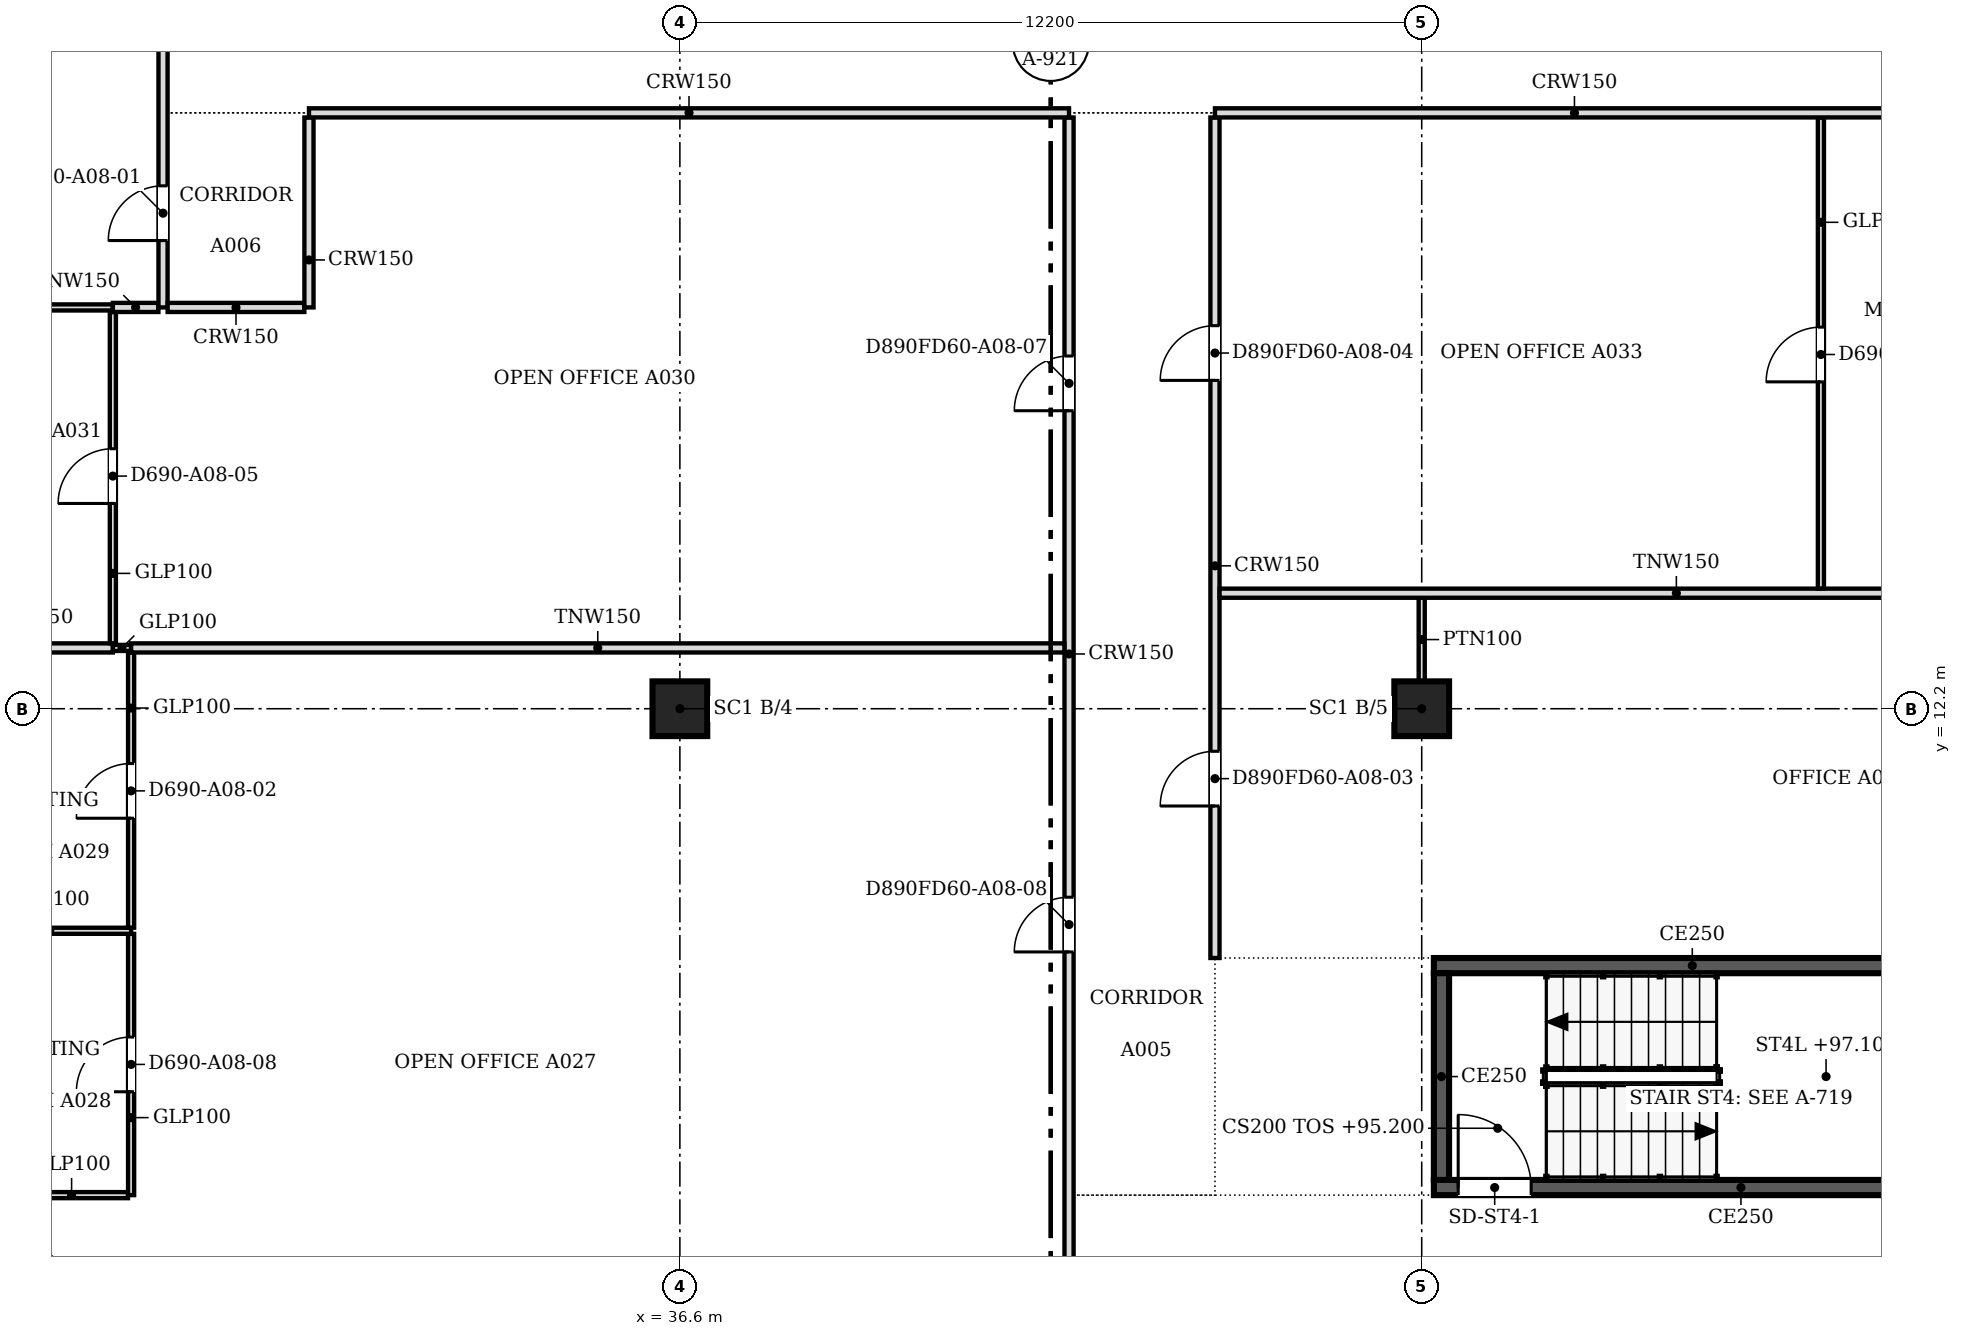
"""IFC4 building model, lengths in metres.
Left out: names, types, materials, properties, quantities, classifications, styles, units other than length and angle.
Written with IfcOpenShell. Run it as: python <this file> out.ifc"""

import sys

from ifc_helpers import new_model, si_unit, direction, frame, frame_2d, origin, origin_2d, place, context, subcontext, project, spatial, polyline, rectangle, outline, extrude, faceted_brep, source, transform, mapped, element, fill, save


model = new_model("IFC4")
c1 = context("Model", 3, precision=1e-05, world=origin(), true_north=direction((0.0, 1.0)))
c2 = subcontext(c1, "Body", "Model", "MODEL_VIEW")
j1 = project(units=[si_unit("LENGTHUNIT", "METRE"), si_unit("PLANEANGLEUNIT", "RADIAN")], contexts=[c1])
p1 = place(None, origin())
s1 = spatial("IfcSite", under=j1, at=p1, CompositionType="ELEMENT")
p2 = place(p1, origin())
s2 = spatial("IfcBuilding", under=s1, at=p2, CompositionType="ELEMENT")
p3 = place(p2, frame((0.0, 0.0, 95.2)))
s3 = spatial("IfcBuildingStorey", under=s2, at=p3, CompositionType="ELEMENT", Elevation=95.2)
for number, where, z_axis, x_axis in (
    (1, (36.6, 12.2, 0.0), (0.0, 0.0, 1.0), (1.0, 0.0, 0.0)),
    (2, (48.8, 12.2, 0.0), (0.0, 0.0, 1.0), (1.0, 0.0, 0.0)),
):
    element("IfcColumn", number, at=place(p3, frame(where, z_axis=z_axis, x_axis=x_axis)), inside=s3, PredefinedType="COLUMN", context=c2, shape_type="SweptSolid", body=[
        extrude(rectangle(XDim=0.9, YDim=0.9, at=origin_2d()), origin(), (0.0, 0.0, 1.0), 3.6),
    ])
m1 = source(origin(), c2, "Body", "Brep", [
    faceted_brep([(2.944, -0.25, 0.0), (2.997, -0.25, 0.068), (2.997, -0.25, 7.532), (2.944, -0.25, 7.6), (0.0, -0.25, 3.8), (0.053, 0.25, 3.868), (2.891, 0.25, 7.532), (2.891, 0.25, 0.068), (0.053, 0.25, 3.732), (2.944, 0.0, 0.0), (2.944, 0.0, 7.6), (0.0, 0.0, 3.8)], [[[0, 1, 2, 3, 4]], [[5, 6, 7, 8]], [[1, 0, 9]], [[10, 3, 2]], [[6, 5, 11, 4, 3, 10]], [[8, 7, 9, 0, 4, 11]], [[8, 11, 5]], [[1, 9, 7, 6, 10, 2]]]),
])
p4 = place(p3, frame((25.712, 3.394, -3.8), z_axis=(0.0, 0.0, 1.0), x_axis=(0.707066050402, -0.707147509625, 0.0)))
e3 = element("IfcWall", 3, at=p4, inside=s3, PredefinedType="SOLIDWALL", context=c2, shape_type="MappedRepresentation", body=[
    mapped(m1, transform((0.0, 0.0, 0.0), scale=1.0)),
])
m2 = source(origin(), c2, "Body", "SweptSolid", [
    extrude(outline(polyline([(2.744, 6.934), (0.316, 3.8), (2.744, 0.667), (2.744, 6.934)])), frame((0.0, 0.26, 0.0), z_axis=(0.0, -1.0, 0.0), x_axis=(1.0, 0.0, 0.0)), (0.0, 0.0, 1.0), 0.52),
])
p5 = place(p4, origin())
e4 = element("IfcOpeningElement", 4, at=p5, cuts=e3, PredefinedType="OPENING", context=c2, shape_type="MappedRepresentation", body=[
    mapped(m2, transform((0.0, 0.0, 0.0), scale=1.0)),
])
p6 = place(p2, frame((0.0, 0.0, 99.0)))
s4 = spatial("IfcBuildingStorey", under=s2, at=p6, CompositionType="ELEMENT", Elevation=99.0)
m3 = source(origin(), c2, "Body", "Brep", [
    faceted_brep([(0.053, -0.25, 0.0), (2.997, -0.25, 3.8), (0.053, -0.25, 7.6), (0.0, -0.25, 7.532), (0.0, -0.25, 0.068), (0.106, 0.25, 7.532), (2.944, 0.25, 3.868), (2.944, 0.25, 3.732), (0.106, 0.25, 0.068), (2.997, 0.0, 3.8), (0.053, 0.0, 0.0), (0.053, 0.0, 7.6)], [[[0, 1, 2, 3, 4]], [[5, 6, 7, 8]], [[8, 7, 9, 1, 0, 10]], [[6, 5, 11, 2, 1, 9]], [[3, 2, 11]], [[10, 0, 4]], [[8, 10, 4, 3, 11, 5]], [[9, 7, 6]]]),
])
p7 = place(p6, frame((25.675, 3.431, -3.8), z_axis=(0.0, 0.0, 1.0), x_axis=(0.707106781187, -0.707106781187, 0.0)))
e5 = element("IfcWall", 5, at=p7, inside=s4, PredefinedType="SOLIDWALL", context=c2, shape_type="MappedRepresentation", body=[
    mapped(m3, transform((0.0, 0.0, 0.0), scale=1.0)),
])
m4 = source(origin(), c2, "Body", "SweptSolid", [
    extrude(outline(polyline([(0.253, 0.666), (2.681, 3.8), (0.253, 6.934), (0.253, 0.666)])), frame((0.0, 0.26, 0.0), z_axis=(0.0, -1.0, 0.0), x_axis=(1.0, 0.0, 0.0)), (0.0, 0.0, 1.0), 0.52),
])
p8 = place(p7, origin())
e6 = element("IfcOpeningElement", 6, at=p8, cuts=e5, PredefinedType="OPENING", context=c2, shape_type="MappedRepresentation", body=[
    mapped(m4, transform((0.0, 0.0, 0.0), scale=1.0)),
])
p9 = place(p3, frame((57.5, 4.325, 0.0), z_axis=(0.0, 0.0, 1.0), x_axis=(-1.0, 0.0, 0.0)))
e7 = element("IfcWall", 7, at=p9, inside=s3, PredefinedType="SOLIDWALL", context=c2, shape_type="SweptSolid", body=[
    extrude(rectangle(XDim=8.5, YDim=0.25, at=frame_2d((4.25, 0.0))), origin(), (0.0, 0.0, 1.0), 3.8),
])
m5 = source(origin(), c2, "Body", "SweptSolid", [
    extrude(rectangle(XDim=1.2, YDim=2.1, at=frame_2d((0.6, 1.05))), frame((0.0, 0.135, 0.0), z_axis=(0.0, -1.0, 0.0), x_axis=(1.0, 0.0, 0.0)), (0.0, 0.0, 1.0), 0.27),
])
p10 = place(p9, frame((6.9, 0.0, 0.0)))
e8 = element("IfcOpeningElement", 8, at=p10, cuts=e7, PredefinedType="OPENING", context=c2, shape_type="MappedRepresentation", body=[
    mapped(m5, transform((0.0, 0.0, 0.0), scale=1.0)),
])
p11 = place(p3, frame((49.125, 4.45, 0.0), z_axis=(0.0, 0.0, 1.0), x_axis=(0.0, 1.0, 0.0)))
e9 = element("IfcWall", 9, at=p11, inside=s3, PredefinedType="SOLIDWALL", context=c2, shape_type="SweptSolid", body=[
    extrude(rectangle(XDim=3.4, YDim=0.25, at=frame_2d((1.7, 0.0))), origin(), (0.0, 0.0, 1.0), 3.8),
])
p12 = place(p3, frame((49.0, 7.975, 0.0), z_axis=(0.0, 0.0, 1.0), x_axis=(1.0, 0.0, 0.0)))
e10 = element("IfcWall", 10, at=p12, inside=s3, PredefinedType="SOLIDWALL", context=c2, shape_type="SweptSolid", body=[
    extrude(rectangle(XDim=8.5, YDim=0.25, at=frame_2d((4.25, 0.0))), origin(), (0.0, 0.0, 1.0), 3.8),
])
p13 = place(p3, frame((43.0, 0.5, 0.0), z_axis=(0.0, 0.0, 1.0), x_axis=(0.0, 1.0, 0.0)))
e11 = element("IfcWall", 11, at=p13, inside=s3, PredefinedType="PARTITIONING", context=c2, shape_type="SweptSolid", body=[
    extrude(rectangle(XDim=21.424, YDim=0.15, at=frame_2d((10.712, 0.0))), origin(), (0.0, 0.0, 1.0), 3.067),
])
m6 = source(origin(), c2, "Body", "SweptSolid", [
    extrude(rectangle(XDim=0.9, YDim=2.1, at=frame_2d((0.45, 1.05))), frame((0.0, 0.085, 0.0), z_axis=(0.0, -1.0, 0.0), x_axis=(1.0, 0.0, 0.0)), (0.0, 0.0, 1.0), 0.17),
])
p14 = place(p13, frame((16.601, 0.0, 0.0)))
e12 = element("IfcOpeningElement", 12, at=p14, cuts=e11, PredefinedType="OPENING", context=c2, shape_type="MappedRepresentation", body=[
    mapped(m6, transform((0.0, 0.0, 0.0), scale=1.0)),
])
p15 = place(p13, frame((7.7, 0.0, 0.0)))
e13 = element("IfcOpeningElement", 13, at=p15, cuts=e11, PredefinedType="OPENING", context=c2, shape_type="MappedRepresentation", body=[
    mapped(m6, transform((0.0, 0.0, 0.0), scale=1.0)),
])
p16 = place(p3, frame((25.669, 4.2, 0.0), z_axis=(0.0, 0.0, 1.0), x_axis=(1.0, 0.0, 0.0)))
e14 = element("IfcWall", 14, at=p16, inside=s3, PredefinedType="PARTITIONING", context=c2, shape_type="SweptSolid", body=[
    extrude(rectangle(XDim=1.855, YDim=0.1, at=frame_2d((0.928, 0.0))), origin(), (0.0, 0.0, 1.0), 3.067),
])
p17 = place(p3, frame((27.575, 4.2, 0.0), z_axis=(0.0, 0.0, 1.0), x_axis=(0.0, 1.0, 0.0)))
e15 = element("IfcWall", 15, at=p17, inside=s3, PredefinedType="PARTITIONING", context=c2, shape_type="SweptSolid", body=[
    extrude(rectangle(XDim=4.297, YDim=0.1, at=frame_2d((2.148, 0.0))), origin(), (0.0, 0.0, 1.0), 3.067),
])
m7 = source(origin(), c2, "Body", "SweptSolid", [
    extrude(rectangle(XDim=0.9, YDim=2.1, at=frame_2d((0.45, 1.05))), frame((0.0, 0.06, 0.0), z_axis=(0.0, -1.0, 0.0), x_axis=(1.0, 0.0, 0.0)), (0.0, 0.0, 1.0), 0.12),
])
p18 = place(p17, frame((1.7, 0.0, 0.0)))
e16 = element("IfcOpeningElement", 16, at=p18, cuts=e15, PredefinedType="OPENING", context=c2, shape_type="MappedRepresentation", body=[
    mapped(m7, transform((0.0, 0.0, 0.0), scale=1.0)),
])
p19 = place(p3, frame((45.4, 21.924, 0.0), z_axis=(0.0, 0.0, 1.0), x_axis=(0.0, -1.0, 0.0)))
e17 = element("IfcWall", 17, at=p19, inside=s3, PredefinedType="PARTITIONING", context=c2, shape_type="SweptSolid", body=[
    extrude(rectangle(XDim=13.824, YDim=0.15, at=frame_2d((6.912, 0.0))), origin(), (0.0, 0.0, 1.0), 3.067),
])
p20 = place(p19, frame((10.424, 0.0, 0.0)))
e18 = element("IfcOpeningElement", 18, at=p20, cuts=e17, PredefinedType="OPENING", context=c2, shape_type="MappedRepresentation", body=[
    mapped(m6, transform((0.0, 0.0, 0.0), scale=1.0)),
])
p21 = place(p19, frame((3.424, 0.0, 0.0)))
e19 = element("IfcOpeningElement", 19, at=p21, cuts=e17, PredefinedType="OPENING", context=c2, shape_type="MappedRepresentation", body=[
    mapped(m6, transform((0.0, 0.0, 0.0), scale=1.0)),
])
p22 = place(p3, frame((24.9, 8.548, 0.0), z_axis=(0.0, 0.0, 1.0), x_axis=(1.0, 0.0, 0.0)))
e20 = element("IfcWall", 20, at=p22, inside=s3, PredefinedType="PARTITIONING", context=c2, shape_type="SweptSolid", body=[
    extrude(rectangle(XDim=2.675, YDim=0.1, at=frame_2d((1.337, 0.0))), origin(), (0.0, 0.0, 1.0), 3.067),
])
p23 = place(p3, frame((27.575, 8.599, 0.0), z_axis=(0.0, 0.0, 1.0), x_axis=(0.0, 1.0, 0.0)))
e21 = element("IfcWall", 21, at=p23, inside=s3, PredefinedType="PARTITIONING", context=c2, shape_type="SweptSolid", body=[
    extrude(rectangle(XDim=4.525, YDim=0.1, at=frame_2d((2.263, 0.0))), origin(), (0.0, 0.0, 1.0), 3.067),
])
p24 = place(p23, frame((1.8, 0.0, 0.0)))
e22 = element("IfcOpeningElement", 22, at=p24, cuts=e21, PredefinedType="OPENING", context=c2, shape_type="MappedRepresentation", body=[
    mapped(m7, transform((0.0, 0.0, 0.0), scale=1.0)),
])
p25 = place(p3, frame((48.8, 12.65, 0.0), z_axis=(0.0, 0.0, 1.0), x_axis=(0.0, 1.0, 0.0)))
e23 = element("IfcWall", 23, at=p25, inside=s3, PredefinedType="PARTITIONING", context=c2, shape_type="SweptSolid", body=[
    extrude(rectangle(XDim=1.375, YDim=0.1, at=frame_2d((0.688, 0.0))), origin(), (0.0, 0.0, 1.0), 3.067),
])
p26 = place(p3, frame((24.55, 13.2, 0.0), z_axis=(0.0, 0.0, 1.0), x_axis=(1.0, 0.0, 0.0)))
e24 = element("IfcWall", 24, at=p26, inside=s3, PredefinedType="PARTITIONING", context=c2, shape_type="SweptSolid", body=[
    extrude(rectangle(XDim=2.725, YDim=0.15, at=frame_2d((1.362, 0.0))), origin(), (0.0, 0.0, 1.0), 3.067),
])
p27 = place(p3, frame((27.276, 13.2, 0.0), z_axis=(0.0, 0.0, 1.0), x_axis=(1.0, 0.0, 0.0)))
e25 = element("IfcWall", 25, at=p27, inside=s3, PredefinedType="PARTITIONING", context=c2, shape_type="SweptSolid", body=[
    extrude(rectangle(XDim=0.298, YDim=0.1, at=frame_2d((0.149, 0.0))), origin(), (0.0, 0.0, 1.0), 3.067),
])
p28 = place(p3, frame((27.575, 13.2, 0.0), z_axis=(0.0, 0.0, 1.0), x_axis=(1.0, 0.0, 0.0)))
e26 = element("IfcWall", 26, at=p28, inside=s3, PredefinedType="PARTITIONING", context=c2, shape_type="SweptSolid", body=[
    extrude(rectangle(XDim=15.349, YDim=0.15, at=frame_2d((7.675, 0.0))), origin(), (0.0, 0.0, 1.0), 3.067),
])
p29 = place(p3, frame((27.275, 13.276, 0.0), z_axis=(0.0, 0.0, 1.0), x_axis=(0.0, 1.0, 0.0)))
e27 = element("IfcWall", 27, at=p29, inside=s3, PredefinedType="PARTITIONING", context=c2, shape_type="SweptSolid", body=[
    extrude(rectangle(XDim=5.448, YDim=0.1, at=frame_2d((2.724, 0.0))), origin(), (0.0, 0.0, 1.0), 3.067),
])
p30 = place(p29, frame((2.3, 0.0, 0.0)))
e28 = element("IfcOpeningElement", 28, at=p30, cuts=e27, PredefinedType="OPENING", context=c2, shape_type="MappedRepresentation", body=[
    mapped(m7, transform((0.0, 0.0, 0.0), scale=1.0)),
])
p31 = place(p3, frame((45.476, 14.1, 0.0), z_axis=(0.0, 0.0, 1.0), x_axis=(1.0, 0.0, 0.0)))
e29 = element("IfcWall", 29, at=p31, inside=s3, PredefinedType="PARTITIONING", context=c2, shape_type="SweptSolid", body=[
    extrude(rectangle(XDim=15.024, YDim=0.15, at=frame_2d((7.512, 0.0))), origin(), (0.0, 0.0, 1.0), 3.067),
])
p32 = place(p3, frame((55.365, 21.924, 0.0), z_axis=(0.0, 0.0, 1.0), x_axis=(0.0, -1.0, 0.0)))
e30 = element("IfcWall", 30, at=p32, inside=s3, PredefinedType="PARTITIONING", context=c2, shape_type="SweptSolid", body=[
    extrude(rectangle(XDim=7.748, YDim=0.1, at=frame_2d((3.874, 0.0))), origin(), (0.0, 0.0, 1.0), 3.067),
])
p33 = place(p32, frame((3.448, 0.0, 0.0)))
e31 = element("IfcOpeningElement", 31, at=p33, cuts=e30, PredefinedType="OPENING", context=c2, shape_type="MappedRepresentation", body=[
    mapped(m7, transform((0.0, 0.0, 0.0), scale=1.0)),
])
p34 = place(p3, frame((22.0, 18.8, 0.0), z_axis=(0.0, 0.0, 1.0), x_axis=(1.0, 0.0, 0.0)))
e32 = element("IfcWall", 32, at=p34, inside=s3, PredefinedType="PARTITIONING", context=c2, shape_type="SweptSolid", body=[
    extrude(rectangle(XDim=5.274, YDim=0.1, at=frame_2d((2.637, 0.0))), origin(), (0.0, 0.0, 1.0), 3.067),
])
p35 = place(p3, frame((27.275, 18.8, 0.0), z_axis=(0.0, 0.0, 1.0), x_axis=(1.0, 0.0, 0.0)))
e33 = element("IfcWall", 33, at=p35, inside=s3, PredefinedType="PARTITIONING", context=c2, shape_type="SweptSolid", body=[
    extrude(rectangle(XDim=0.749, YDim=0.15, at=frame_2d((0.375, 0.0))), origin(), (0.0, 0.0, 1.0), 3.067),
])
p36 = place(p3, frame((28.1, 18.8, 0.0), z_axis=(0.0, 0.0, 1.0), x_axis=(0.0, 1.0, 0.0)))
e34 = element("IfcWall", 34, at=p36, inside=s3, PredefinedType="PARTITIONING", context=c2, shape_type="SweptSolid", body=[
    extrude(rectangle(XDim=26.424, YDim=0.15, at=frame_2d((13.212, 0.0))), origin(), (0.0, 0.0, 1.0), 3.067),
])
p37 = place(p36, frame((1.1, 0.0, 0.0)))
e35 = element("IfcOpeningElement", 35, at=p37, cuts=e34, PredefinedType="OPENING", context=c2, shape_type="MappedRepresentation", body=[
    mapped(m6, transform((0.0, 0.0, 0.0), scale=1.0)),
])
p38 = place(p36, frame((23.151, 0.0, 0.0)))
e36 = element("IfcOpeningElement", 36, at=p38, cuts=e34, PredefinedType="OPENING", context=c2, shape_type="MappedRepresentation", body=[
    mapped(m6, transform((0.0, 0.0, 0.0), scale=1.0)),
])
m8 = source(origin(), c2, "Body", "SweptSolid", [
    extrude(rectangle(XDim=1.0, YDim=2.1, at=frame_2d((0.5, 1.05))), frame((0.0, 0.085, 0.0), z_axis=(0.0, -1.0, 0.0), x_axis=(1.0, 0.0, 0.0)), (0.0, 0.0, 1.0), 0.17),
])
p39 = place(p36, frame((17.251, 0.0, 0.0)))
e37 = element("IfcOpeningElement", 37, at=p39, cuts=e34, PredefinedType="OPENING", context=c2, shape_type="MappedRepresentation", body=[
    mapped(m8, transform((0.0, 0.0, 0.0), scale=1.0)),
])
p40 = place(p36, frame((9.7, 0.0, 0.0)))
e38 = element("IfcOpeningElement", 38, at=p40, cuts=e34, PredefinedType="OPENING", context=c2, shape_type="MappedRepresentation", body=[
    mapped(m6, transform((0.0, 0.0, 0.0), scale=1.0)),
])
p41 = place(p3, frame((28.176, 18.8, 0.0), z_axis=(0.0, 0.0, 1.0), x_axis=(1.0, 0.0, 0.0)))
e39 = element("IfcWall", 39, at=p41, inside=s3, PredefinedType="PARTITIONING", context=c2, shape_type="SweptSolid", body=[
    extrude(rectangle(XDim=2.248, YDim=0.15, at=frame_2d((1.124, 0.0))), origin(), (0.0, 0.0, 1.0), 3.067),
])
p42 = place(p3, frame((30.5, 18.8, 0.0), z_axis=(0.0, 0.0, 1.0), x_axis=(0.0, 1.0, 0.0)))
e40 = element("IfcWall", 40, at=p42, inside=s3, PredefinedType="PARTITIONING", context=c2, shape_type="SweptSolid", body=[
    extrude(rectangle(XDim=3.124, YDim=0.15, at=frame_2d((1.562, 0.0))), origin(), (0.0, 0.0, 1.0), 3.067),
])
p43 = place(p3, frame((30.5, 22.0, 0.0), z_axis=(0.0, 0.0, 1.0), x_axis=(1.0, 0.0, 0.0)))
e41 = element("IfcWall", 41, at=p43, inside=s3, PredefinedType="PARTITIONING", context=c2, shape_type="SweptSolid", body=[
    extrude(rectangle(XDim=12.5, YDim=0.15, at=frame_2d((6.25, 0.0))), origin(), (0.0, 0.0, 1.0), 3.067),
])
p44 = place(p3, frame((45.4, 22.0, 0.0), z_axis=(0.0, 0.0, 1.0), x_axis=(1.0, 0.0, 0.0)))
e42 = element("IfcWall", 42, at=p44, inside=s3, PredefinedType="PARTITIONING", context=c2, shape_type="SweptSolid", body=[
    extrude(rectangle(XDim=11.824, YDim=0.15, at=frame_2d((5.912, 0.0))), origin(), (0.0, 0.0, 1.0), 3.067),
])
m9 = source(origin(), c2, "Body", "SweptSolid", [
    extrude(rectangle(XDim=1.2, YDim=2.1, at=frame_2d((0.6, 1.05))), frame((0.0, 0.025, 0.0), z_axis=(0.0, -1.0, 0.0), x_axis=(1.0, 0.0, 0.0)), (0.0, 0.0, 1.0), 0.05),
])
p45 = place(p10, origin())
e43 = element("IfcDoor", 43, at=p45, inside=s3, OperationType="SINGLE_SWING_RIGHT", PredefinedType="DOOR", context=c2, shape_type="MappedRepresentation", body=[
    mapped(m9, transform((0.0, 0.0, 0.0), scale=1.0)),
])
fill(e8, e43)
m10 = source(origin(), c2, "Body", "SweptSolid", [
    extrude(rectangle(XDim=0.9, YDim=2.1, at=frame_2d((0.45, 1.05))), frame((0.0, 0.025, 0.0), z_axis=(0.0, -1.0, 0.0), x_axis=(1.0, 0.0, 0.0)), (0.0, 0.0, 1.0), 0.05),
])
p46 = place(p37, origin())
e44 = element("IfcDoor", 44, at=p46, inside=s3, OperationType="SINGLE_SWING_LEFT", PredefinedType="DOOR", context=c2, shape_type="MappedRepresentation", body=[
    mapped(m10, transform((0.0, 0.0, 0.0), scale=1.0)),
])
fill(e35, e44)
p47 = place(p24, origin())
e45 = element("IfcDoor", 45, at=p47, inside=s3, OperationType="SINGLE_SWING_LEFT", PredefinedType="DOOR", context=c2, shape_type="MappedRepresentation", body=[
    mapped(m10, transform((0.0, 0.0, 0.0), scale=1.0)),
])
fill(e22, e45)
p48 = place(p30, origin())
e46 = element("IfcDoor", 46, at=p48, inside=s3, OperationType="SINGLE_SWING_LEFT", PredefinedType="DOOR", context=c2, shape_type="MappedRepresentation", body=[
    mapped(m10, transform((0.0, 0.0, 0.0), scale=1.0)),
])
fill(e28, e46)
p49 = place(p20, origin())
e47 = element("IfcDoor", 47, at=p49, inside=s3, OperationType="SINGLE_SWING_RIGHT", PredefinedType="DOOR", context=c2, shape_type="MappedRepresentation", body=[
    mapped(m10, transform((0.0, 0.0, 0.0), scale=1.0)),
])
fill(e18, e47)
p50 = place(p18, origin())
e48 = element("IfcDoor", 48, at=p50, inside=s3, OperationType="SINGLE_SWING_LEFT", PredefinedType="DOOR", context=c2, shape_type="MappedRepresentation", body=[
    mapped(m10, transform((0.0, 0.0, 0.0), scale=1.0)),
])
fill(e16, e48)
p51 = place(p33, origin())
e49 = element("IfcDoor", 49, at=p51, inside=s3, OperationType="SINGLE_SWING_RIGHT", PredefinedType="DOOR", context=c2, shape_type="MappedRepresentation", body=[
    mapped(m10, transform((0.0, 0.0, 0.0), scale=1.0)),
])
fill(e31, e49)
p52 = place(p21, origin())
e50 = element("IfcDoor", 50, at=p52, inside=s3, OperationType="SINGLE_SWING_RIGHT", PredefinedType="DOOR", context=c2, shape_type="MappedRepresentation", body=[
    mapped(m10, transform((0.0, 0.0, 0.0), scale=1.0)),
])
fill(e19, e50)
p53 = place(p14, origin())
e51 = element("IfcDoor", 51, at=p53, inside=s3, OperationType="SINGLE_SWING_LEFT", PredefinedType="DOOR", context=c2, shape_type="MappedRepresentation", body=[
    mapped(m10, transform((0.0, 0.0, 0.0), scale=1.0)),
])
fill(e12, e51)
p54 = place(p15, origin())
e52 = element("IfcDoor", 52, at=p54, inside=s3, OperationType="SINGLE_SWING_LEFT", PredefinedType="DOOR", context=c2, shape_type="MappedRepresentation", body=[
    mapped(m10, transform((0.0, 0.0, 0.0), scale=1.0)),
])
fill(e13, e52)
save(model, sys.argv[1])
